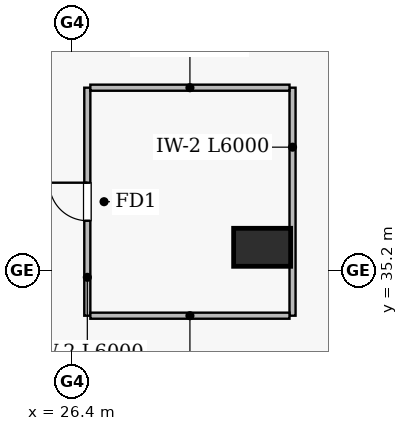
"""IFC4 building model, lengths in metres.
Left out: names, types, materials, properties, quantities, classifications, styles, units other than length and angle.
Written with IfcOpenShell. Run it as: python <this file> out.ifc"""

import sys

from ifc_helpers import new_model, si_unit, direction, frame, frame_2d, origin, origin_2d, place, context, subcontext, project, spatial, rectangle, extrude, element, fill, save


model = new_model("IFC4")
c1 = context("Model", 3, precision=1e-05, world=origin(), true_north=direction((0.0, 1.0)))
c2 = subcontext(c1, "Body", "Model", "MODEL_VIEW")
j1 = project(units=[si_unit("LENGTHUNIT", "METRE"), si_unit("PLANEANGLEUNIT", "RADIAN")], contexts=[c1])
p1 = place(None, origin())
s1 = spatial("IfcSite", under=j1, at=p1, CompositionType="ELEMENT")
p2 = place(p1, origin())
s2 = spatial("IfcBuilding", under=s1, at=p2, CompositionType="ELEMENT")
p3 = place(p2, frame((0.0, 0.0, -15.6)))
s3 = spatial("IfcBuildingStorey", under=s2, at=p3, CompositionType="ELEMENT", Elevation=-15.6)
p4 = place(p3, frame((31.4, 35.8, 0.0), z_axis=(0.0, 0.0, 1.0), x_axis=(1.0, 0.0, 0.0)))
e1 = element("IfcColumn", 1, at=p4, inside=s3, PredefinedType="COLUMN", context=c2, shape_type="SweptSolid", body=[
    extrude(rectangle(XDim=1.5, YDim=1.0, at=origin_2d()), origin(), (0.0, 0.0, 1.0), 3.9),
])
p5 = place(p3, frame((26.8, 34.0, 0.0), z_axis=(0.0, 0.0, 1.0), x_axis=(0.0, 1.0, 0.0)))
e2 = element("IfcWall", 2, at=p5, inside=s3, PredefinedType="SOLIDWALL", context=c2, shape_type="SweptSolid", body=[
    extrude(rectangle(XDim=6.0, YDim=0.16, at=frame_2d((3.0, 0.0))), origin(), (0.0, 0.0, 1.0), 3.58),
])
p6 = place(p5, frame((2.5, 0.0, 0.0)))
e3 = element("IfcOpeningElement", 3, at=p6, cuts=e2, PredefinedType="OPENING", context=c2, shape_type="SweptSolid", body=[
    extrude(rectangle(XDim=1.0, YDim=2.15, at=frame_2d((0.5, 1.075))), frame((0.0, 0.09, 0.0), z_axis=(0.0, -1.0, 0.0), x_axis=(1.0, 0.0, 0.0)), (0.0, 0.0, 1.0), 0.18),
])
p7 = place(p3, frame((32.2, 40.0, 0.0), z_axis=(0.0, 0.0, 1.0), x_axis=(0.0, -1.0, 0.0)))
e4 = element("IfcWall", 4, at=p7, inside=s3, PredefinedType="SOLIDWALL", context=c2, shape_type="SweptSolid", body=[
    extrude(rectangle(XDim=6.0, YDim=0.16, at=frame_2d((3.0, 0.0))), origin(), (0.0, 0.0, 1.0), 2.668),
])
p8 = place(p3, frame((26.88, 40.0, 0.0), z_axis=(0.0, 0.0, 1.0), x_axis=(1.0, 0.0, 0.0)))
e5 = element("IfcWall", 5, at=p8, inside=s3, PredefinedType="SOLIDWALL", context=c2, shape_type="SweptSolid", body=[
    extrude(rectangle(XDim=5.24, YDim=0.16, at=frame_2d((2.62, 0.0))), origin(), (0.0, 0.0, 1.0), 2.668),
])
p9 = place(p3, frame((32.12, 34.0, 0.0), z_axis=(0.0, 0.0, 1.0), x_axis=(-1.0, 0.0, 0.0)))
e6 = element("IfcWall", 6, at=p9, inside=s3, PredefinedType="SOLIDWALL", context=c2, shape_type="SweptSolid", body=[
    extrude(rectangle(XDim=5.24, YDim=0.16, at=frame_2d((2.62, 0.0))), origin(), (0.0, 0.0, 1.0), 2.768),
])
p10 = place(p6, origin())
e7 = element("IfcDoor", 7, at=p10, inside=s3, OperationType="SINGLE_SWING_RIGHT", PredefinedType="DOOR", context=c2, shape_type="SweptSolid", body=[
    extrude(rectangle(XDim=1.0, YDim=2.15, at=frame_2d((0.5, 1.075))), frame((0.0, 0.025, 0.0), z_axis=(0.0, -1.0, 0.0), x_axis=(1.0, 0.0, 0.0)), (0.0, 0.0, 1.0), 0.05),
])
fill(e3, e7)
save(model, sys.argv[1])
